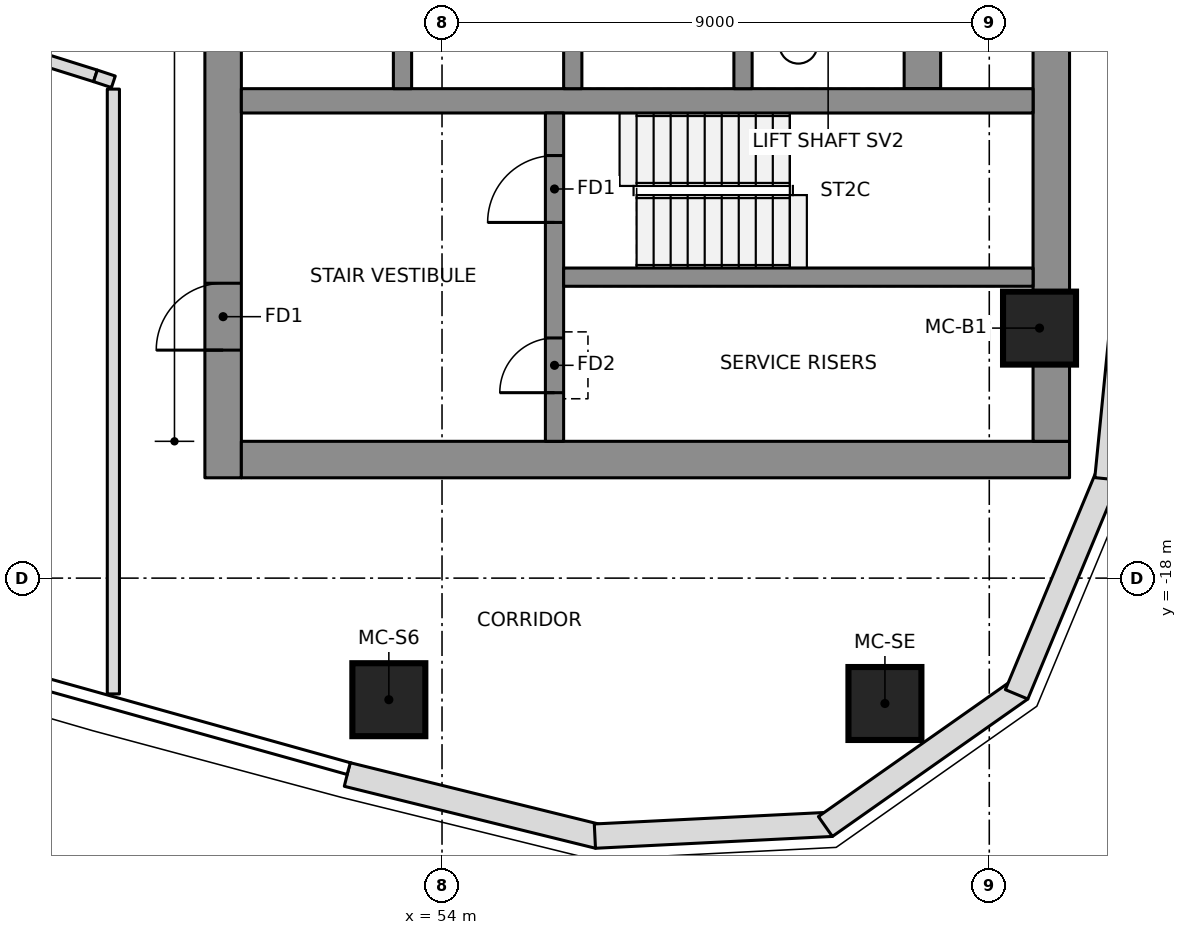
"""IFC4 building model, lengths in metres.
Left out: names, types, materials, properties, quantities, classifications, styles, units other than length and angle.
Written with IfcOpenShell. Run it as: python <this file> out.ifc"""

import sys

from ifc_helpers import new_model, si_unit, direction, frame, frame_2d, origin, origin_2d, place, context, subcontext, project, spatial, polyline, rectangle, outline, extrude, element, fill, save


model = new_model("IFC4")
c1 = context("Model", 3, precision=1e-05, world=origin(), true_north=direction((0.0, 1.0)))
c2 = subcontext(c1, "Body", "Model", "MODEL_VIEW")
j1 = project(units=[si_unit("LENGTHUNIT", "METRE"), si_unit("PLANEANGLEUNIT", "RADIAN")], contexts=[c1])
p1 = place(None, origin())
s1 = spatial("IfcSite", under=j1, at=p1, CompositionType="ELEMENT")
p2 = place(p1, origin())
s2 = spatial("IfcBuilding", under=s1, at=p2, CompositionType="ELEMENT")
p3 = place(p2, frame((0.0, 0.0, 238.55)))
s3 = spatial("IfcBuildingStorey", under=s2, at=p3, CompositionType="ELEMENT", Elevation=238.55)
p4 = place(p3, frame((50.4, -16.35, 0.0), z_axis=(0.0, 0.0, 1.0), x_axis=(0.0, 1.0, 0.0)))
e1 = element("IfcWall", 1, at=p4, inside=s3, PredefinedType="SHEAR", context=c2, shape_type="SweptSolid", body=[
    extrude(rectangle(XDim=9.7, YDim=0.6, at=frame_2d((4.85, 0.0))), origin(), (0.0, 0.0, 1.0), 3.55),
])
p5 = place(p4, frame((2.1, 0.0, 0.0)))
e2 = element("IfcOpeningElement", 2, at=p5, cuts=e1, PredefinedType="OPENING", context=c2, shape_type="SweptSolid", body=[
    extrude(rectangle(XDim=1.1, YDim=2.1, at=frame_2d((0.55, 1.05))), frame((0.0, 0.31, 0.0), z_axis=(0.0, -1.0, 0.0), x_axis=(1.0, 0.0, 0.0)), (0.0, 0.0, 1.0), 0.62),
])
p6 = place(p3, frame((50.7, -16.05, 0.0), z_axis=(0.0, 0.0, 1.0), x_axis=(1.0, 0.0, 0.0)))
e3 = element("IfcWall", 3, at=p6, inside=s3, PredefinedType="SHEAR", context=c2, shape_type="SweptSolid", body=[
    extrude(rectangle(XDim=13.62, YDim=0.6, at=frame_2d((6.81, 0.0))), origin(), (0.0, 0.0, 1.0), 3.55),
])
p7 = place(p3, frame((64.02, -15.75, 0.0), z_axis=(0.0, 0.0, 1.0), x_axis=(0.0, 1.0, 0.0)))
e4 = element("IfcWall", 4, at=p7, inside=s3, PredefinedType="SHEAR", context=c2, shape_type="SweptSolid", body=[
    extrude(rectangle(XDim=8.248, YDim=0.6, at=frame_2d((4.124, 0.0))), origin(), (0.0, 0.0, 1.0), 3.55),
])
p8 = place(p3, frame((61.9, -9.95, 0.0), z_axis=(0.0, 0.0, 1.0), x_axis=(0.0, 1.0, 0.0)))
e5 = element("IfcWall", 5, at=p8, inside=s3, PredefinedType="SHEAR", context=c2, shape_type="SweptSolid", body=[
    extrude(rectangle(XDim=19.9, YDim=0.6, at=frame_2d((9.95, 0.0))), origin(), (0.0, 0.0, 1.0), 3.55),
])
p9 = place(p3, frame((50.7, -10.15, 0.0), z_axis=(0.0, 0.0, 1.0), x_axis=(1.0, 0.0, 0.0)))
e6 = element("IfcWall", 6, at=p9, inside=s3, PredefinedType="SHEAR", context=c2, shape_type="SweptSolid", body=[
    extrude(rectangle(XDim=13.02, YDim=0.4, at=frame_2d((6.51, 0.0))), origin(), (0.0, 0.0, 1.0), 3.55),
])
for number, where, z_axis, x_axis in (
    (7, (53.35, -9.95, 0.0), (0.0, 0.0, 1.0), (0.0, 1.0, 0.0)),
    (8, (56.15, -9.95, 0.0), (0.0, 0.0, 1.0), (0.0, 1.0, 0.0)),
    (9, (58.95, -9.95, 0.0), (0.0, 0.0, 1.0), (0.0, 1.0, 0.0)),
):
    element("IfcWall", number, at=place(p3, frame(where, z_axis=z_axis, x_axis=x_axis)), inside=s3, PredefinedType="SHEAR", context=c2, shape_type="SweptSolid", body=[
        extrude(rectangle(XDim=3.0, YDim=0.3, at=frame_2d((1.5, 0.0))), origin(), (0.0, 0.0, 1.0), 3.55),
    ])
p10 = place(p3, frame((55.85, -15.75, 0.0), z_axis=(0.0, 0.0, 1.0), x_axis=(0.0, 1.0, 0.0)))
e10 = element("IfcWall", 10, at=p10, inside=s3, PredefinedType="SHEAR", context=c2, shape_type="SweptSolid", body=[
    extrude(rectangle(XDim=5.4, YDim=0.3, at=frame_2d((2.7, 0.0))), origin(), (0.0, 0.0, 1.0), 3.55),
])
p11 = place(p10, frame((3.6, 0.0, 0.0)))
e11 = element("IfcOpeningElement", 11, at=p11, cuts=e10, PredefinedType="OPENING", context=c2, shape_type="SweptSolid", body=[
    extrude(rectangle(XDim=1.1, YDim=2.1, at=frame_2d((0.55, 1.05))), frame((0.0, 0.16, 0.0), z_axis=(0.0, -1.0, 0.0), x_axis=(1.0, 0.0, 0.0)), (0.0, 0.0, 1.0), 0.32),
])
p12 = place(p10, frame((0.8, 0.0, 0.0)))
e12 = element("IfcOpeningElement", 12, at=p12, cuts=e10, PredefinedType="OPENING", context=c2, shape_type="SweptSolid", body=[
    extrude(rectangle(XDim=0.9, YDim=2.1, at=frame_2d((0.45, 1.05))), frame((0.0, 0.16, 0.0), z_axis=(0.0, -1.0, 0.0), x_axis=(1.0, 0.0, 0.0)), (0.0, 0.0, 1.0), 0.32),
])
p13 = place(p3, frame((56.0, -13.05, 0.0), z_axis=(0.0, 0.0, 1.0), x_axis=(1.0, 0.0, 0.0)))
e13 = element("IfcWall", 13, at=p13, inside=s3, PredefinedType="SHEAR", context=c2, shape_type="SweptSolid", body=[
    extrude(rectangle(XDim=7.72, YDim=0.3, at=frame_2d((3.86, 0.0))), origin(), (0.0, 0.0, 1.0), 3.55),
])
for number, where, z_axis, x_axis in (
    (14, (53.125, -20.0, 0.0), (0.0, 0.0, 1.0), (1.0, 0.0, 0.0)),
    (15, (61.284, -20.062, 0.0), (0.0, 0.0, 1.0), (1.0, 0.0, 0.0)),
    (16, (63.826, -13.888, 0.0), (0.0, 0.0, 1.0), (1.0, 0.0, 0.0)),
):
    element("IfcColumn", number, at=place(p3, frame(where, z_axis=z_axis, x_axis=x_axis)), inside=s3, PredefinedType="COLUMN", context=c2, shape_type="SweptSolid", body=[
        extrude(rectangle(XDim=1.2, YDim=1.2, at=origin_2d()), origin(), (0.0, 0.0, 1.0), 3.55),
    ])
p14 = place(p3, frame((52.441, -21.23, 0.0), z_axis=(0.0, 0.0, 1.0), x_axis=(0.970902342456, -0.23947576373, 0.0)))
e17 = element("IfcWall", 17, at=p14, inside=s3, PredefinedType="NOTDEFINED", context=c2, shape_type="SweptSolid", body=[
    extrude(outline(polyline([(0.0, -0.2), (4.255, -0.2), (4.197, 0.2), (0.0, 0.2), (0.0, -0.2)])), origin(), (0.0, 0.0, 1.0), 3.25),
])
p15 = place(p3, frame((56.543, -22.242, 0.0), z_axis=(0.0, 0.0, 1.0), x_axis=(0.998758875872, 0.049806705046, 0.0)))
e18 = element("IfcWall", 18, at=p15, inside=s3, PredefinedType="NOTDEFINED", context=c2, shape_type="SweptSolid", body=[
    extrude(outline(polyline([(-0.029, -0.2), (3.871, -0.2), (3.756, 0.2), (0.029, 0.2), (-0.029, -0.2)])), origin(), (0.0, 0.0, 1.0), 3.25),
])
p16 = place(p3, frame((60.352, -22.052, 0.0), z_axis=(0.0, 0.0, 1.0), x_axis=(0.817942545532, 0.575299915009, 0.0)))
e19 = element("IfcWall", 19, at=p16, inside=s3, PredefinedType="NOTDEFINED", context=c2, shape_type="SweptSolid", body=[
    extrude(outline(polyline([(-0.058, -0.2), (3.871, -0.2), (3.756, 0.2), (0.058, 0.2), (-0.058, -0.2)])), origin(), (0.0, 0.0, 1.0), 3.25),
])
p17 = place(p3, frame((63.471, -19.858, 0.0), z_axis=(0.0, 0.0, 1.0), x_axis=(0.3844335483, 0.923152667191, 0.0)))
e20 = element("IfcWall", 20, at=p17, inside=s3, PredefinedType="NOTDEFINED", context=c2, shape_type="SweptSolid", body=[
    extrude(outline(polyline([(-0.058, -0.2), (3.843, -0.2), (3.784, 0.2), (0.058, 0.2), (-0.058, -0.2)])), origin(), (0.0, 0.0, 1.0), 3.25),
])
p18 = place(p3, frame((64.938, -16.337, 0.0), z_axis=(0.0, 0.0, 1.0), x_axis=(0.098718218066, 0.995115427185, 0.0)))
e21 = element("IfcWall", 21, at=p18, inside=s3, PredefinedType="NOTDEFINED", context=c2, shape_type="SweptSolid", body=[
    extrude(outline(polyline([(-0.03, -0.2), (4.096, -0.2), (4.09, 0.2), (0.03, 0.2), (-0.03, -0.2)])), origin(), (0.0, 0.0, 1.0), 3.25),
])
p19 = place(p3, frame((40.38, -7.257, 0.0), z_axis=(0.0, 0.0, 1.0), x_axis=(0.954235234728, -0.299057046068, 0.0)))
e22 = element("IfcWall", 22, at=p19, inside=s3, PredefinedType="PARTITIONING", context=c2, shape_type="SweptSolid", body=[
    extrude(rectangle(XDim=8.3, YDim=0.2, at=frame_2d((4.15, 0.0))), origin(), (0.0, 0.0, 1.0), 3.25),
])
p20 = place(p19, frame((2.8, 0.0, 0.0)))
e23 = element("IfcOpeningElement", 23, at=p20, cuts=e22, PredefinedType="OPENING", context=c2, shape_type="SweptSolid", body=[
    extrude(rectangle(XDim=1.5, YDim=2.1, at=frame_2d((0.75, 1.05))), frame((0.0, 0.11, 0.0), z_axis=(0.0, -1.0, 0.0), x_axis=(1.0, 0.0, 0.0)), (0.0, 0.0, 1.0), 0.22),
])
p21 = place(p3, frame((48.3, -9.739, 0.0), z_axis=(0.0, 0.0, 1.0), x_axis=(0.949310105444, -0.314341094518, 0.0)))
e24 = element("IfcWall", 24, at=p21, inside=s3, PredefinedType="PARTITIONING", context=c2, shape_type="SweptSolid", body=[
    extrude(rectangle(XDim=0.311, YDim=0.2, at=frame_2d((0.155, 0.0))), origin(), (0.0, 0.0, 1.0), 3.25),
])
p22 = place(p3, frame((48.595, -9.957, 0.0), z_axis=(0.0, 0.0, 1.0), x_axis=(0.0, -1.0, 0.0)))
e25 = element("IfcWall", 25, at=p22, inside=s3, PredefinedType="PARTITIONING", context=c2, shape_type="SweptSolid", body=[
    extrude(rectangle(XDim=9.947, YDim=0.2, at=frame_2d((4.974, 0.0))), origin(), (0.0, 0.0, 1.0), 3.25),
])
p23 = place(p11, origin())
e26 = element("IfcDoor", 26, at=p23, inside=s3, OperationType="SINGLE_SWING_RIGHT", PredefinedType="DOOR", context=c2, shape_type="SweptSolid", body=[
    extrude(rectangle(XDim=1.1, YDim=2.1, at=frame_2d((0.55, 1.05))), frame((0.0, 0.025, 0.0), z_axis=(0.0, -1.0, 0.0), x_axis=(1.0, 0.0, 0.0)), (0.0, 0.0, 1.0), 0.05),
])
fill(e11, e26)
p24 = place(p5, origin())
e27 = element("IfcDoor", 27, at=p24, inside=s3, OperationType="SINGLE_SWING_RIGHT", PredefinedType="DOOR", context=c2, shape_type="SweptSolid", body=[
    extrude(rectangle(XDim=1.1, YDim=2.1, at=frame_2d((0.55, 1.05))), frame((0.0, 0.025, 0.0), z_axis=(0.0, -1.0, 0.0), x_axis=(1.0, 0.0, 0.0)), (0.0, 0.0, 1.0), 0.05),
])
fill(e2, e27)
p25 = place(p12, origin())
e28 = element("IfcDoor", 28, at=p25, inside=s3, OperationType="SINGLE_SWING_LEFT", PredefinedType="DOOR", context=c2, shape_type="SweptSolid", body=[
    extrude(rectangle(XDim=0.9, YDim=2.1, at=frame_2d((0.45, 1.05))), frame((0.0, 0.025, 0.0), z_axis=(0.0, -1.0, 0.0), x_axis=(1.0, 0.0, 0.0)), (0.0, 0.0, 1.0), 0.05),
])
fill(e12, e28)
save(model, sys.argv[1])
